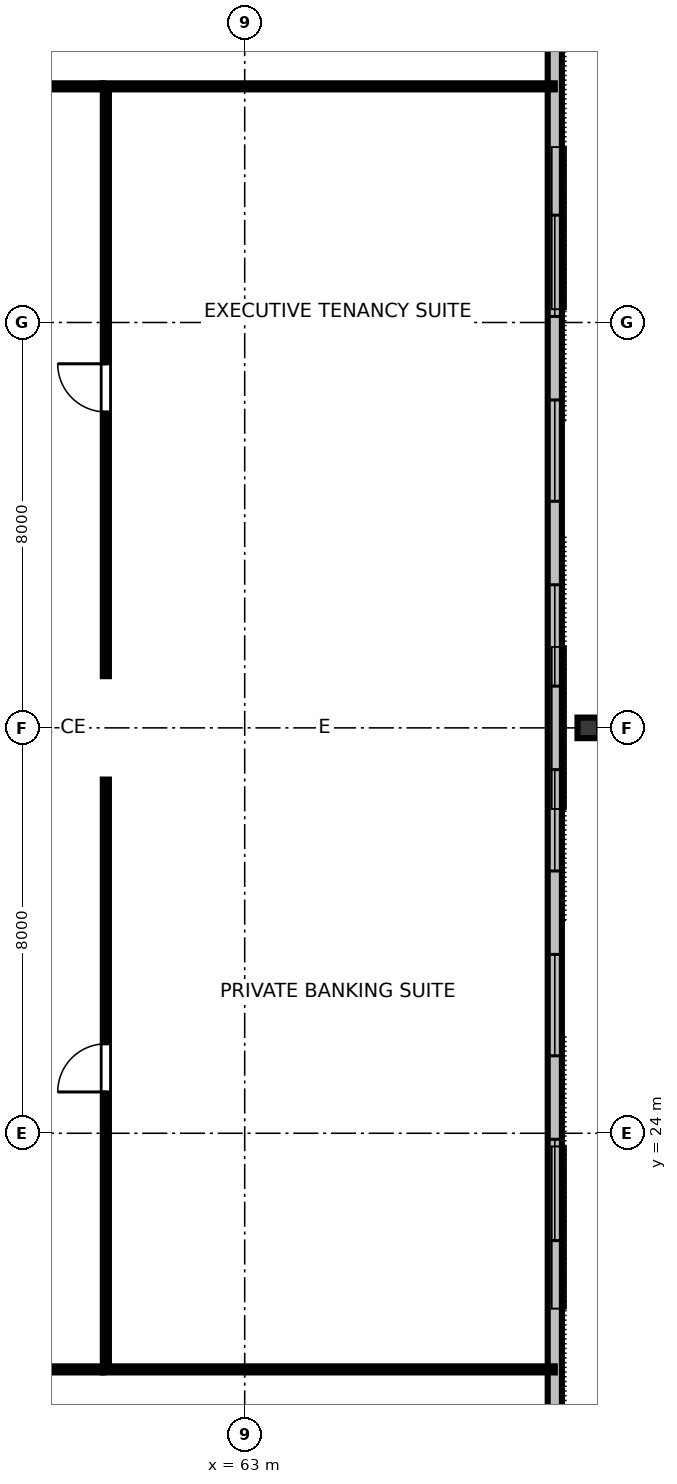
"""IFC4 building model, lengths in metres.
Left out: names, types, materials, properties, quantities, classifications, styles, units other than length and angle.
Written with IfcOpenShell. Run it as: python <this file> out.ifc"""

import sys

from ifc_helpers import new_model, si_unit, direction, frame, frame_2d, origin, origin_2d, place, context, subcontext, project, spatial, rectangle, i_section, extrude, element, fill, save


model = new_model("IFC4")
c1 = context("Model", 3, precision=1e-05, world=origin(), true_north=direction((0.0, 1.0)))
c2 = subcontext(c1, "Body", "Model", "MODEL_VIEW")
j1 = project(units=[si_unit("LENGTHUNIT", "METRE"), si_unit("PLANEANGLEUNIT", "RADIAN")], contexts=[c1])
p1 = place(None, origin())
s1 = spatial("IfcSite", under=j1, at=p1, CompositionType="ELEMENT")
p2 = place(p1, origin())
s2 = spatial("IfcBuilding", under=s1, at=p2, CompositionType="ELEMENT")
p3 = place(p2, frame((0.0, 0.0, 156.4)))
s3 = spatial("IfcBuildingStorey", under=s2, at=p3, CompositionType="ELEMENT", Elevation=156.4)
p4 = place(p3, frame((69.78, 32.0, 0.0), z_axis=(0.088994797504, 0.0, 0.996032090857), x_axis=(-0.996032090857, 0.0, 0.088994797504)))
e1 = element("IfcColumn", 1, at=p4, inside=s3, PredefinedType="COLUMN", context=c2, shape_type="SweptSolid", body=[
    extrude(i_section(OverallWidth=0.406, OverallDepth=0.425, WebThickness=0.033, FlangeThickness=0.052, FilletRadius=0.025, at=origin_2d()), origin(), (0.0, 0.0, 1.0), 3.372),
])
p5 = place(p3, frame((69.12, 16.31, 0.0), z_axis=(0.0, 0.0, 1.0), x_axis=(0.0, 1.0, 0.0)))
e2 = element("IfcWall", 2, at=p5, inside=s3, PredefinedType="STANDARD", context=c2, shape_type="SweptSolid", body=[
    extrude(rectangle(XDim=31.38, YDim=0.28, at=frame_2d((15.69, 0.0))), origin(), (0.0, 0.0, 1.0), 3.36),
])
p6 = place(p5, frame((5.571, 0.0, 0.8)))
e3 = element("IfcOpeningElement", 3, at=p6, cuts=e2, PredefinedType="OPENING", context=c2, shape_type="SweptSolid", body=[
    extrude(rectangle(XDim=2.0, YDim=1.95, at=frame_2d((1.0, 0.975))), frame((0.0, 0.15, 0.0), z_axis=(0.0, -1.0, 0.0), x_axis=(1.0, 0.0, 0.0)), (0.0, 0.0, 1.0), 0.3),
])
p7 = place(p5, frame((9.219, 0.0, 0.8)))
e4 = element("IfcOpeningElement", 4, at=p7, cuts=e2, PredefinedType="OPENING", context=c2, shape_type="SweptSolid", body=[
    extrude(rectangle(XDim=2.0, YDim=1.95, at=frame_2d((1.0, 0.975))), frame((0.0, 0.15, 0.0), z_axis=(0.0, -1.0, 0.0), x_axis=(1.0, 0.0, 0.0)), (0.0, 0.0, 1.0), 0.3),
])
p8 = place(p5, frame((12.866, 0.0, 0.8)))
e5 = element("IfcOpeningElement", 5, at=p8, cuts=e2, PredefinedType="OPENING", context=c2, shape_type="SweptSolid", body=[
    extrude(rectangle(XDim=2.0, YDim=1.95, at=frame_2d((1.0, 0.975))), frame((0.0, 0.15, 0.0), z_axis=(0.0, -1.0, 0.0), x_axis=(1.0, 0.0, 0.0)), (0.0, 0.0, 1.0), 0.3),
])
p9 = place(p5, frame((16.514, 0.0, 0.8)))
e6 = element("IfcOpeningElement", 6, at=p9, cuts=e2, PredefinedType="OPENING", context=c2, shape_type="SweptSolid", body=[
    extrude(rectangle(XDim=2.0, YDim=1.95, at=frame_2d((1.0, 0.975))), frame((0.0, 0.15, 0.0), z_axis=(0.0, -1.0, 0.0), x_axis=(1.0, 0.0, 0.0)), (0.0, 0.0, 1.0), 0.3),
])
p10 = place(p5, frame((20.161, 0.0, 0.8)))
e7 = element("IfcOpeningElement", 7, at=p10, cuts=e2, PredefinedType="OPENING", context=c2, shape_type="SweptSolid", body=[
    extrude(rectangle(XDim=2.0, YDim=1.95, at=frame_2d((1.0, 0.975))), frame((0.0, 0.15, 0.0), z_axis=(0.0, -1.0, 0.0), x_axis=(1.0, 0.0, 0.0)), (0.0, 0.0, 1.0), 0.3),
])
p11 = place(p5, frame((23.809, 0.0, 0.8)))
e8 = element("IfcOpeningElement", 8, at=p11, cuts=e2, PredefinedType="OPENING", context=c2, shape_type="SweptSolid", body=[
    extrude(rectangle(XDim=2.0, YDim=1.95, at=frame_2d((1.0, 0.975))), frame((0.0, 0.15, 0.0), z_axis=(0.0, -1.0, 0.0), x_axis=(1.0, 0.0, 0.0)), (0.0, 0.0, 1.0), 0.3),
])
p12 = place(p3, frame((31.8, 19.34, 0.0), z_axis=(0.0, 0.0, 1.0), x_axis=(1.0, 0.0, 0.0)))
e9 = element("IfcWall", 9, at=p12, inside=s3, PredefinedType="PARTITIONING", context=c2, shape_type="SweptSolid", body=[
    extrude(rectangle(XDim=28.4, YDim=0.12, at=frame_2d((14.2, 0.0))), origin(), (0.0, 0.0, 1.0), 2.64),
])
p13 = place(p12, frame((4.789, 0.0, 0.0)))
e10 = element("IfcOpeningElement", 10, at=p13, cuts=e9, PredefinedType="OPENING", context=c2, shape_type="SweptSolid", body=[
    extrude(rectangle(XDim=0.95, YDim=2.15, at=frame_2d((0.475, 1.075))), frame((0.0, 0.07, 0.0), z_axis=(0.0, -1.0, 0.0), x_axis=(1.0, 0.0, 0.0)), (0.0, 0.0, 1.0), 0.14),
])
p14 = place(p12, frame((12.708, 0.0, 0.0)))
e11 = element("IfcOpeningElement", 11, at=p14, cuts=e9, PredefinedType="OPENING", context=c2, shape_type="SweptSolid", body=[
    extrude(rectangle(XDim=0.95, YDim=2.15, at=frame_2d((0.475, 1.075))), frame((0.0, 0.07, 0.0), z_axis=(0.0, -1.0, 0.0), x_axis=(1.0, 0.0, 0.0)), (0.0, 0.0, 1.0), 0.14),
])
p15 = place(p12, frame((21.645, 0.0, 0.0)))
e12 = element("IfcOpeningElement", 12, at=p15, cuts=e9, PredefinedType="OPENING", context=c2, shape_type="SweptSolid", body=[
    extrude(rectangle(XDim=0.95, YDim=2.15, at=frame_2d((0.475, 1.075))), frame((0.0, 0.07, 0.0), z_axis=(0.0, -1.0, 0.0), x_axis=(1.0, 0.0, 0.0)), (0.0, 0.0, 1.0), 0.14),
])
p16 = place(p3, frame((31.8, 44.66, 0.0), z_axis=(0.0, 0.0, 1.0), x_axis=(1.0, 0.0, 0.0)))
e13 = element("IfcWall", 13, at=p16, inside=s3, PredefinedType="PARTITIONING", context=c2, shape_type="SweptSolid", body=[
    extrude(rectangle(XDim=28.4, YDim=0.12, at=frame_2d((14.2, 0.0))), origin(), (0.0, 0.0, 1.0), 2.64),
])
p17 = place(p16, frame((4.036, 0.0, 0.0)))
e14 = element("IfcOpeningElement", 14, at=p17, cuts=e13, PredefinedType="OPENING", context=c2, shape_type="SweptSolid", body=[
    extrude(rectangle(XDim=0.95, YDim=2.15, at=frame_2d((0.475, 1.075))), frame((0.0, 0.07, 0.0), z_axis=(0.0, -1.0, 0.0), x_axis=(1.0, 0.0, 0.0)), (0.0, 0.0, 1.0), 0.14),
])
p18 = place(p16, frame((12.256, 0.0, 0.0)))
e15 = element("IfcOpeningElement", 15, at=p18, cuts=e13, PredefinedType="OPENING", context=c2, shape_type="SweptSolid", body=[
    extrude(rectangle(XDim=0.95, YDim=2.15, at=frame_2d((0.475, 1.075))), frame((0.0, 0.07, 0.0), z_axis=(0.0, -1.0, 0.0), x_axis=(1.0, 0.0, 0.0)), (0.0, 0.0, 1.0), 0.14),
])
p19 = place(p16, frame((18.246, 0.0, 0.0)))
e16 = element("IfcOpeningElement", 16, at=p19, cuts=e13, PredefinedType="OPENING", context=c2, shape_type="SweptSolid", body=[
    extrude(rectangle(XDim=0.95, YDim=2.15, at=frame_2d((0.475, 1.075))), frame((0.0, 0.07, 0.0), z_axis=(0.0, -1.0, 0.0), x_axis=(1.0, 0.0, 0.0)), (0.0, 0.0, 1.0), 0.14),
])
p20 = place(p16, frame((24.086, 0.0, 0.0)))
e17 = element("IfcOpeningElement", 17, at=p20, cuts=e13, PredefinedType="OPENING", context=c2, shape_type="SweptSolid", body=[
    extrude(rectangle(XDim=0.95, YDim=2.15, at=frame_2d((0.475, 1.075))), frame((0.0, 0.07, 0.0), z_axis=(0.0, -1.0, 0.0), x_axis=(1.0, 0.0, 0.0)), (0.0, 0.0, 1.0), 0.14),
])
p21 = place(p3, frame((60.26, 19.4, 0.0), z_axis=(0.0, 0.0, 1.0), x_axis=(0.0, 1.0, 0.0)))
e18 = element("IfcWall", 18, at=p21, inside=s3, PredefinedType="PARTITIONING", context=c2, shape_type="SweptSolid", body=[
    extrude(rectangle(XDim=11.58, YDim=0.12, at=frame_2d((5.79, 0.0))), origin(), (0.0, 0.0, 1.0), 2.64),
])
p22 = place(p21, frame((5.415, 0.0, 0.0)))
e19 = element("IfcOpeningElement", 19, at=p22, cuts=e18, PredefinedType="OPENING", context=c2, shape_type="SweptSolid", body=[
    extrude(rectangle(XDim=0.95, YDim=2.15, at=frame_2d((0.475, 1.075))), frame((0.0, 0.07, 0.0), z_axis=(0.0, -1.0, 0.0), x_axis=(1.0, 0.0, 0.0)), (0.0, 0.0, 1.0), 0.14),
])
p23 = place(p3, frame((60.26, 33.02, 0.0), z_axis=(0.0, 0.0, 1.0), x_axis=(0.0, 1.0, 0.0)))
e20 = element("IfcWall", 20, at=p23, inside=s3, PredefinedType="PARTITIONING", context=c2, shape_type="SweptSolid", body=[
    extrude(rectangle(XDim=11.58, YDim=0.12, at=frame_2d((5.79, 0.0))), origin(), (0.0, 0.0, 1.0), 2.64),
])
p24 = place(p23, frame((5.215, 0.0, 0.0)))
e21 = element("IfcOpeningElement", 21, at=p24, cuts=e20, PredefinedType="OPENING", context=c2, shape_type="SweptSolid", body=[
    extrude(rectangle(XDim=0.95, YDim=2.15, at=frame_2d((0.475, 1.075))), frame((0.0, 0.07, 0.0), z_axis=(0.0, -1.0, 0.0), x_axis=(1.0, 0.0, 0.0)), (0.0, 0.0, 1.0), 0.14),
])
for number, where, z_axis, x_axis in (
    (22, (60.2, 19.34, 0.0), (0.0, 0.0, 1.0), (1.0, 0.0, 0.0)),
    (23, (60.2, 44.66, 0.0), (0.0, 0.0, 1.0), (1.0, 0.0, 0.0)),
):
    element("IfcWall", number, at=place(p3, frame(where, z_axis=z_axis, x_axis=x_axis)), inside=s3, PredefinedType="PARTITIONING", context=c2, shape_type="SweptSolid", body=[
        extrude(rectangle(XDim=8.92, YDim=0.12, at=frame_2d((4.46, 0.0))), origin(), (0.0, 0.0, 1.0), 2.64),
    ])
p25 = place(p6, origin())
e24 = element("IfcWindow", 24, at=p25, inside=s3, PartitioningType="SINGLE_PANEL", PredefinedType="WINDOW", context=c2, shape_type="SweptSolid", body=[
    extrude(rectangle(XDim=2.0, YDim=1.95, at=frame_2d((1.0, 0.975))), frame((0.0, 0.03, 0.0), z_axis=(0.0, -1.0, 0.0), x_axis=(1.0, 0.0, 0.0)), (0.0, 0.0, 1.0), 0.06),
])
fill(e3, e24)
p26 = place(p7, origin())
e25 = element("IfcWindow", 25, at=p26, inside=s3, PartitioningType="SINGLE_PANEL", PredefinedType="WINDOW", context=c2, shape_type="SweptSolid", body=[
    extrude(rectangle(XDim=2.0, YDim=1.95, at=frame_2d((1.0, 0.975))), frame((0.0, 0.03, 0.0), z_axis=(0.0, -1.0, 0.0), x_axis=(1.0, 0.0, 0.0)), (0.0, 0.0, 1.0), 0.06),
])
fill(e4, e25)
p27 = place(p8, origin())
e26 = element("IfcWindow", 26, at=p27, inside=s3, PartitioningType="SINGLE_PANEL", PredefinedType="WINDOW", context=c2, shape_type="SweptSolid", body=[
    extrude(rectangle(XDim=2.0, YDim=1.95, at=frame_2d((1.0, 0.975))), frame((0.0, 0.03, 0.0), z_axis=(0.0, -1.0, 0.0), x_axis=(1.0, 0.0, 0.0)), (0.0, 0.0, 1.0), 0.06),
])
fill(e5, e26)
p28 = place(p9, origin())
e27 = element("IfcWindow", 27, at=p28, inside=s3, PartitioningType="SINGLE_PANEL", PredefinedType="WINDOW", context=c2, shape_type="SweptSolid", body=[
    extrude(rectangle(XDim=2.0, YDim=1.95, at=frame_2d((1.0, 0.975))), frame((0.0, 0.03, 0.0), z_axis=(0.0, -1.0, 0.0), x_axis=(1.0, 0.0, 0.0)), (0.0, 0.0, 1.0), 0.06),
])
fill(e6, e27)
p29 = place(p10, origin())
e28 = element("IfcWindow", 28, at=p29, inside=s3, PartitioningType="SINGLE_PANEL", PredefinedType="WINDOW", context=c2, shape_type="SweptSolid", body=[
    extrude(rectangle(XDim=2.0, YDim=1.95, at=frame_2d((1.0, 0.975))), frame((0.0, 0.03, 0.0), z_axis=(0.0, -1.0, 0.0), x_axis=(1.0, 0.0, 0.0)), (0.0, 0.0, 1.0), 0.06),
])
fill(e7, e28)
p30 = place(p11, origin())
e29 = element("IfcWindow", 29, at=p30, inside=s3, PartitioningType="SINGLE_PANEL", PredefinedType="WINDOW", context=c2, shape_type="SweptSolid", body=[
    extrude(rectangle(XDim=2.0, YDim=1.95, at=frame_2d((1.0, 0.975))), frame((0.0, 0.03, 0.0), z_axis=(0.0, -1.0, 0.0), x_axis=(1.0, 0.0, 0.0)), (0.0, 0.0, 1.0), 0.06),
])
fill(e8, e29)
p31 = place(p22, origin())
e30 = element("IfcDoor", 30, at=p31, inside=s3, OperationType="SINGLE_SWING_LEFT", PredefinedType="DOOR", context=c2, shape_type="SweptSolid", body=[
    extrude(rectangle(XDim=0.95, YDim=2.15, at=frame_2d((0.475, 1.075))), frame((0.0, 0.025, 0.0), z_axis=(0.0, -1.0, 0.0), x_axis=(1.0, 0.0, 0.0)), (0.0, 0.0, 1.0), 0.05),
])
fill(e19, e30)
p32 = place(p24, origin())
e31 = element("IfcDoor", 31, at=p32, inside=s3, OperationType="SINGLE_SWING_RIGHT", PredefinedType="DOOR", context=c2, shape_type="SweptSolid", body=[
    extrude(rectangle(XDim=0.95, YDim=2.15, at=frame_2d((0.475, 1.075))), frame((0.0, 0.025, 0.0), z_axis=(0.0, -1.0, 0.0), x_axis=(1.0, 0.0, 0.0)), (0.0, 0.0, 1.0), 0.05),
])
fill(e21, e31)
save(model, sys.argv[1])
